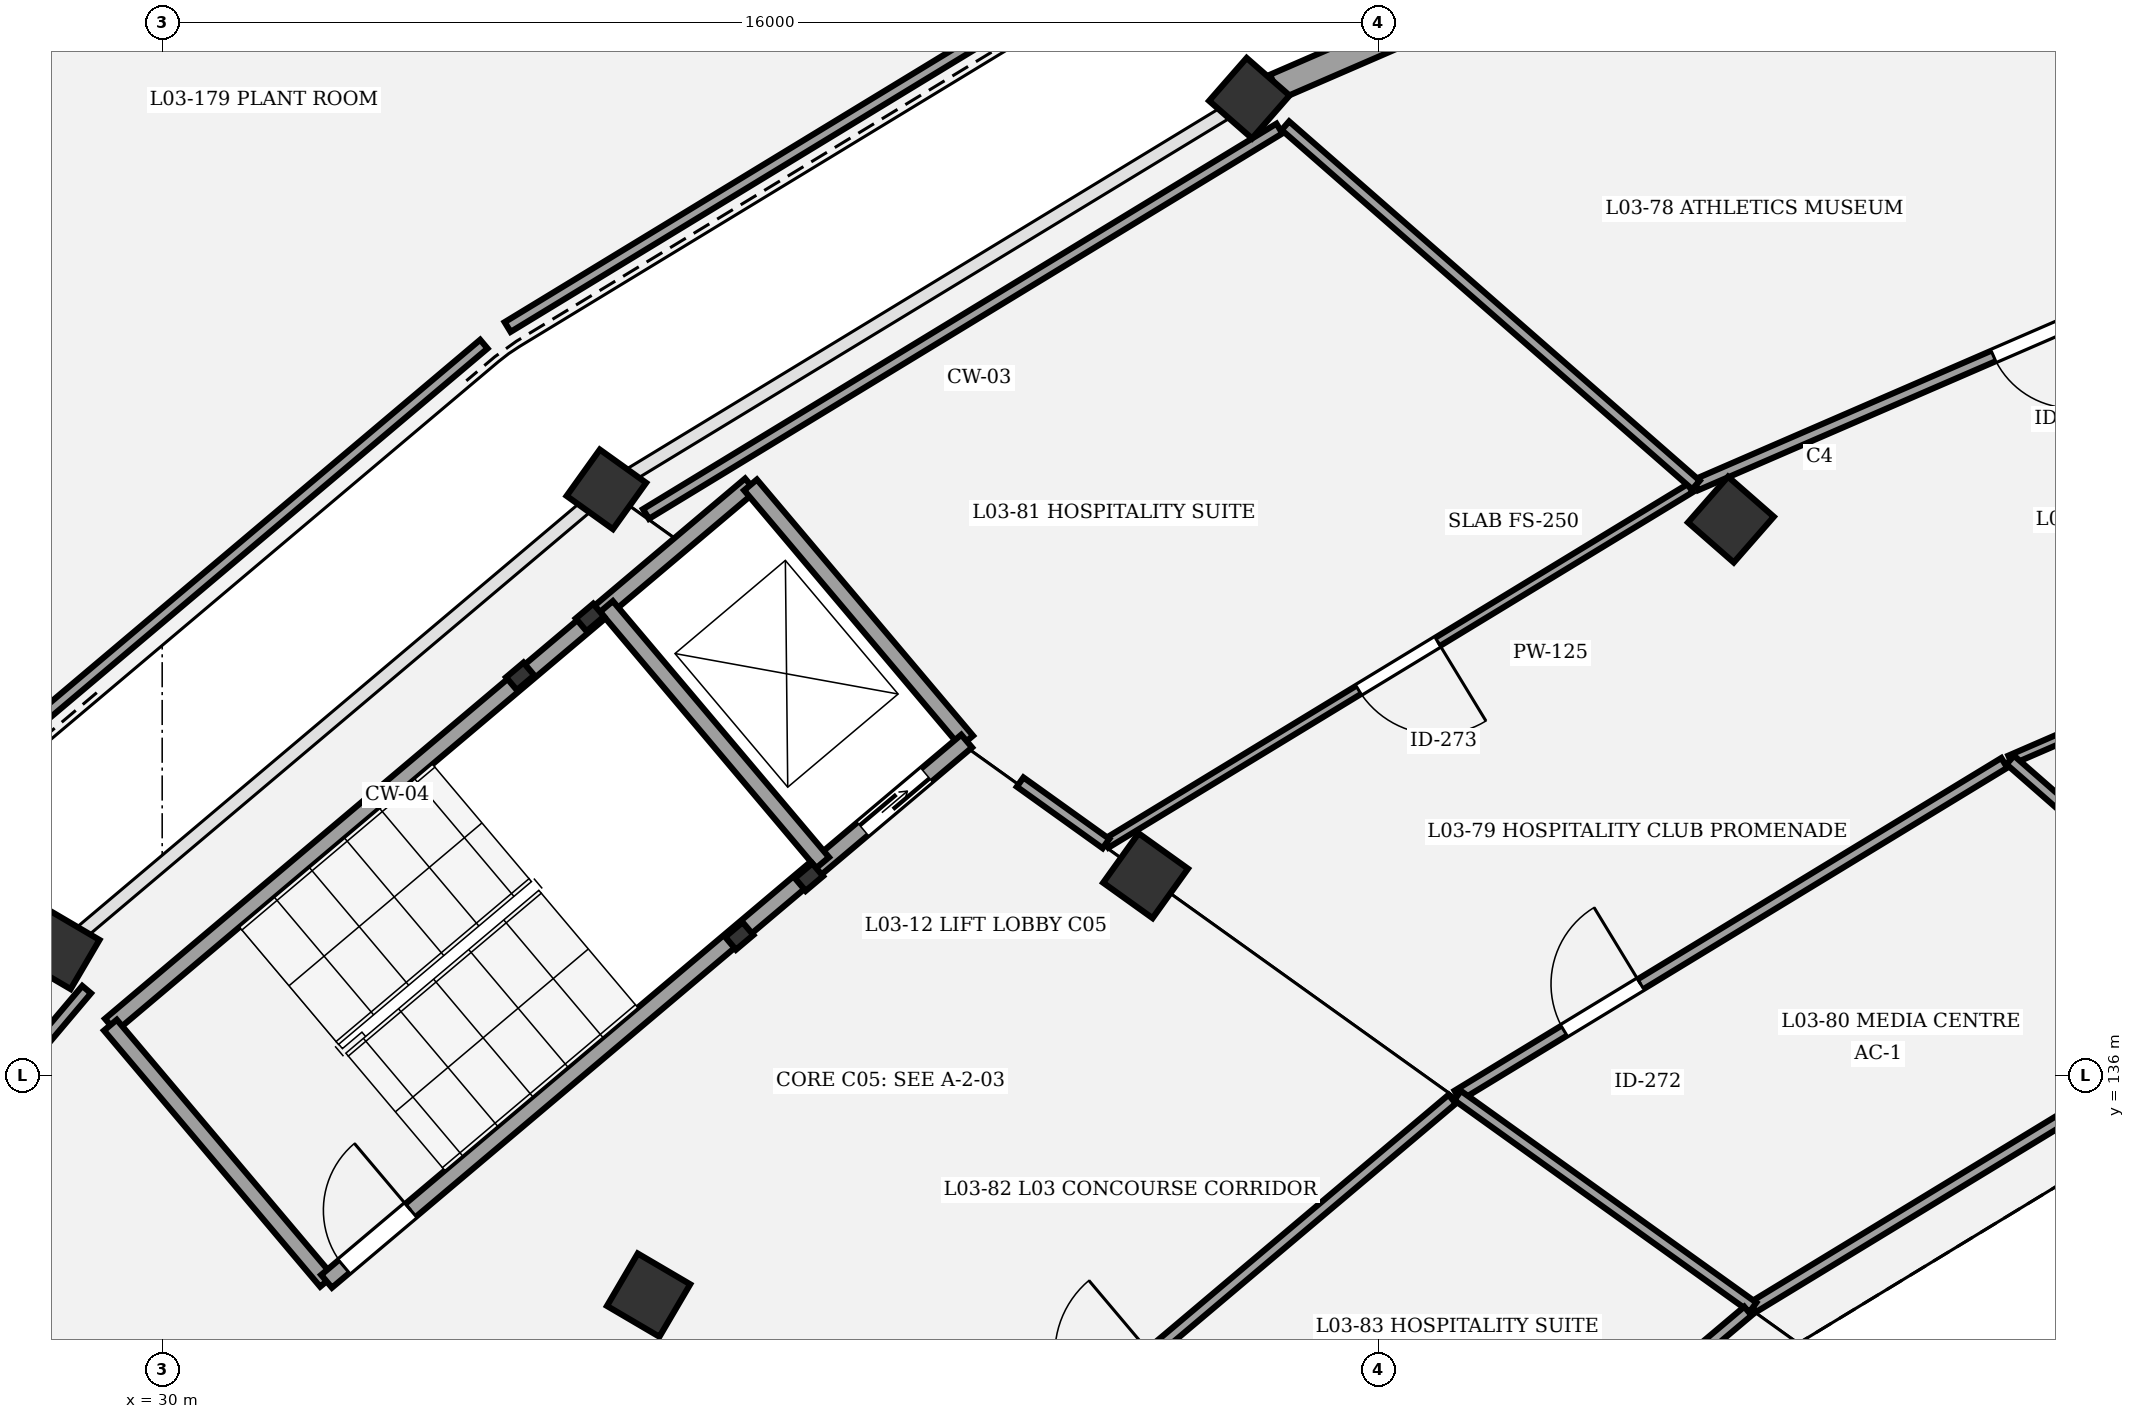
"""IFC4 building model, lengths in metres.
Left out: names, types, materials, properties, quantities, classifications, styles, units other than length and angle.
Written with IfcOpenShell. Run it as: python <this file> out.ifc"""

import sys

from ifc_helpers import new_model, si_unit, direction, frame, frame_2d, origin, origin_2d, place, context, subcontext, project, spatial, rectangle, extrude, element, fill, save


model = new_model("IFC4")
c1 = context("Model", 3, precision=1e-05, world=origin(), true_north=direction((0.0, 1.0)))
c2 = subcontext(c1, "Body", "Model", "MODEL_VIEW")
j1 = project(units=[si_unit("LENGTHUNIT", "METRE"), si_unit("PLANEANGLEUNIT", "RADIAN")], contexts=[c1])
p1 = place(None, origin())
s1 = spatial("IfcSite", under=j1, at=p1, CompositionType="ELEMENT")
p2 = place(p1, origin())
s2 = spatial("IfcBuilding", under=s1, at=p2, CompositionType="ELEMENT")
p3 = place(p2, frame((0.0, 0.0, 14.7)))
s3 = spatial("IfcBuildingStorey", under=s2, at=p3, CompositionType="ELEMENT", Elevation=14.7)
p4 = place(p3, frame((50.64, 143.317, 0.0), z_axis=(0.0, 0.0, 1.0), x_axis=(-0.752529860433, 0.658558128912, 0.0)))
e1 = element("IfcColumn", 1, at=p4, inside=s3, PredefinedType="COLUMN", context=c2, shape_type="SweptSolid", body=[
    extrude(rectangle(XDim=0.8, YDim=0.8, at=origin_2d()), origin(), (0.0, 0.0, 1.0), 4.5),
])
p5 = place(p3, frame((44.304, 148.861, 0.0), z_axis=(0.0, 0.0, 1.0), x_axis=(-0.752529860433, 0.658558128912, 0.0)))
e2 = element("IfcColumn", 2, at=p5, inside=s3, PredefinedType="COLUMN", context=c2, shape_type="SweptSolid", body=[
    extrude(rectangle(XDim=0.75, YDim=0.75, at=origin_2d()), origin(), (0.0, 0.0, 1.0), 4.5),
])
p6 = place(p3, frame((42.939, 138.632, 0.0), z_axis=(0.0, 0.0, 1.0), x_axis=(-0.812897512265, 0.582406760395, 0.0)))
e3 = element("IfcColumn", 3, at=p6, inside=s3, PredefinedType="COLUMN", context=c2, shape_type="SweptSolid", body=[
    extrude(rectangle(XDim=0.8, YDim=0.8, at=origin_2d()), origin(), (0.0, 0.0, 1.0), 4.5),
])
p7 = place(p3, frame((35.844, 143.715, 0.0), z_axis=(0.0, 0.0, 1.0), x_axis=(-0.812897512265, 0.582406760395, 0.0)))
e4 = element("IfcColumn", 4, at=p7, inside=s3, PredefinedType="COLUMN", context=c2, shape_type="SweptSolid", body=[
    extrude(rectangle(XDim=0.75, YDim=0.75, at=origin_2d()), origin(), (0.0, 0.0, 1.0), 4.5),
])
p8 = place(p3, frame((36.4, 133.114, 0.0), z_axis=(0.0, 0.0, 1.0), x_axis=(-0.862513669207, 0.506033764121, 0.0)))
e5 = element("IfcColumn", 5, at=p8, inside=s3, PredefinedType="COLUMN", context=c2, shape_type="SweptSolid", body=[
    extrude(rectangle(XDim=0.8, YDim=0.8, at=origin_2d()), origin(), (0.0, 0.0, 1.0), 4.5),
])
p9 = place(p3, frame((28.662, 137.654, 0.0), z_axis=(0.0, 0.0, 1.0), x_axis=(-0.862513669207, 0.506033764121, 0.0)))
e6 = element("IfcColumn", 6, at=p9, inside=s3, PredefinedType="COLUMN", context=c2, shape_type="SweptSolid", body=[
    extrude(rectangle(XDim=0.75, YDim=0.75, at=origin_2d()), origin(), (0.0, 0.0, 1.0), 4.5),
])
p10 = place(p3, frame((44.646, 149.009, 0.0), z_axis=(0.0, 0.0, 1.0), x_axis=(0.917502782842, 0.397729359587, 0.0)))
e7 = element("IfcWall", 7, at=p10, inside=s3, PredefinedType="STANDARD", context=c2, shape_type="SweptSolid", body=[
    extrude(rectangle(XDim=9.89, YDim=0.35, at=frame_2d((4.945, 0.0))), origin(), (0.0, 0.0, 1.0), 3.42),
])
p11 = place(p10, frame((4.045, 0.0, 0.0)))
e8 = element("IfcOpeningElement", 8, at=p11, cuts=e7, PredefinedType="OPENING", context=c2, shape_type="SweptSolid", body=[
    extrude(rectangle(XDim=1.8, YDim=2.4, at=frame_2d((0.9, 1.2))), frame((0.0, 0.185, 0.0), z_axis=(0.0, -1.0, 0.0), x_axis=(1.0, 0.0, 0.0)), (0.0, 0.0, 1.0), 0.37),
])
for number, where, z_axis, x_axis in (
    (9, (37.593, 137.839, 0.0), (0.0, 0.0, 1.0), (0.764, 0.645, 0.0)),
    (10, (38.51, 138.613, 0.0), (0.0, 0.0, 1.0), (0.764, 0.645, 0.0)),
    (11, (35.627, 142.029, 0.0), (0.0, 0.0, 1.0), (0.764, 0.645, 0.0)),
    (12, (34.71, 141.255, 0.0), (0.0, 0.0, 1.0), (0.764, 0.645, 0.0)),
):
    element("IfcColumn", number, at=place(p3, frame(where, z_axis=z_axis, x_axis=x_axis)), inside=s3, PredefinedType="COLUMN", context=c2, shape_type="SweptSolid", body=[
        extrude(rectangle(XDim=0.3, YDim=0.22, at=origin_2d()), origin(), (0.0, 0.0, 1.0), 4.5),
    ])
p12 = place(p3, frame((29.319, 136.666, 0.0), z_axis=(0.0, 0.0, 1.0), x_axis=(0.764247804305, 0.644922703598, 0.0)))
e13 = element("IfcWall", 13, at=p12, inside=s3, PredefinedType="SHEAR", context=c2, shape_type="SweptSolid", body=[
    extrude(rectangle(XDim=11.02, YDim=0.22, at=frame_2d((5.51, 0.0))), origin(), (0.0, 0.0, 1.0), 4.25),
])
p13 = place(p3, frame((32.163, 133.296, 0.0), z_axis=(0.0, 0.0, 1.0), x_axis=(-0.644904288042, 0.764263344185, 0.0)))
e14 = element("IfcWall", 14, at=p13, inside=s3, PredefinedType="SHEAR", context=c2, shape_type="SweptSolid", body=[
    extrude(rectangle(XDim=4.41, YDim=0.22, at=frame_2d((2.205, 0.0))), origin(), (0.0, 0.0, 1.0), 4.25),
])
p14 = place(p3, frame((40.585, 140.403, 0.0), z_axis=(0.0, 0.0, 1.0), x_axis=(-0.644936622785, 0.764236058159, 0.0)))
e15 = element("IfcWall", 15, at=p14, inside=s3, PredefinedType="SHEAR", context=c2, shape_type="SweptSolid", body=[
    extrude(rectangle(XDim=4.41, YDim=0.22, at=frame_2d((2.205, 0.0))), origin(), (0.0, 0.0, 1.0), 4.25),
])
p15 = place(p3, frame((32.163, 133.296, 0.0), z_axis=(0.0, 0.0, 1.0), x_axis=(0.764257018762, 0.644911784102, 0.0)))
e16 = element("IfcWall", 16, at=p15, inside=s3, PredefinedType="SHEAR", context=c2, shape_type="SweptSolid", body=[
    extrude(rectangle(XDim=11.02, YDim=0.22, at=frame_2d((5.51, 0.0))), origin(), (0.0, 0.0, 1.0), 4.25),
])
p16 = place(p15, frame((0.3, 0.0, 0.0)))
e17 = element("IfcOpeningElement", 17, at=p16, cuts=e16, PredefinedType="OPENING", context=c2, shape_type="SweptSolid", body=[
    extrude(rectangle(XDim=1.15, YDim=2.15, at=frame_2d((0.575, 1.075))), frame((0.0, 0.12, 0.0), z_axis=(0.0, -1.0, 0.0), x_axis=(1.0, 0.0, 0.0)), (0.0, 0.0, 1.0), 0.24),
])
p17 = place(p15, frame((9.23, 0.0, 0.0)))
e18 = element("IfcOpeningElement", 18, at=p17, cuts=e16, PredefinedType="OPENING", context=c2, shape_type="SweptSolid", body=[
    extrude(rectangle(XDim=1.1, YDim=2.15, at=frame_2d((0.55, 1.075))), frame((0.0, 0.12, 0.0), z_axis=(0.0, -1.0, 0.0), x_axis=(1.0, 0.0, 0.0)), (0.0, 0.0, 1.0), 0.24),
])
p18 = place(p3, frame((38.689, 138.803, 0.0), z_axis=(0.0, 0.0, 1.0), x_axis=(-0.644904288042, 0.764263344185, 0.0)))
e19 = element("IfcWall", 19, at=p18, inside=s3, PredefinedType="SHEAR", context=c2, shape_type="SweptSolid", body=[
    extrude(rectangle(XDim=4.41, YDim=0.22, at=frame_2d((2.205, 0.0))), origin(), (0.0, 0.0, 1.0), 4.25),
])
p19 = place(p3, frame((54.315, 140.154, 0.0), z_axis=(0.0, 0.0, 1.0), x_axis=(0.917494590455, 0.397748257677, 0.0)))
e20 = element("IfcWall", 20, at=p19, inside=s3, PredefinedType="PARTITIONING", context=c2, shape_type="SweptSolid", body=[
    extrude(rectangle(XDim=9.049, YDim=0.125, at=frame_2d((4.525, 0.0))), origin(), (0.0, 0.0, 1.0), 3.25),
])
p20 = place(p19, frame((1.782, 0.0, 0.0)))
e21 = element("IfcOpeningElement", 21, at=p20, cuts=e20, PredefinedType="OPENING", context=c2, shape_type="SweptSolid", body=[
    extrude(rectangle(XDim=1.1, YDim=2.2, at=frame_2d((0.55, 1.1))), frame((0.0, 0.073, 0.0), z_axis=(0.0, -1.0, 0.0), x_axis=(1.0, 0.0, 0.0)), (0.0, 0.0, 1.0), 0.145),
])
p21 = place(p3, frame((59.054, 147.619, 0.0), z_axis=(0.0, 0.0, 1.0), x_axis=(-0.917508957037, -0.39771511633, 0.0)))
e22 = element("IfcWall", 22, at=p21, inside=s3, PredefinedType="PARTITIONING", context=c2, shape_type="SweptSolid", body=[
    extrude(rectangle(XDim=9.671, YDim=0.15, at=frame_2d((4.836, 0.0))), origin(), (0.0, 0.0, 1.0), 3.25),
])
p22 = place(p21, frame((4.266, 0.0, 0.0)))
e23 = element("IfcOpeningElement", 23, at=p22, cuts=e22, PredefinedType="OPENING", context=c2, shape_type="SweptSolid", body=[
    extrude(rectangle(XDim=1.14, YDim=2.2, at=frame_2d((0.57, 1.1))), frame((0.0, 0.085, 0.0), z_axis=(0.0, -1.0, 0.0), x_axis=(1.0, 0.0, 0.0)), (0.0, 0.0, 1.0), 0.17),
])
p23 = place(p3, frame((47.043, 135.74, 0.0), z_axis=(0.0, 0.0, 1.0), x_axis=(0.854330104408, 0.519730769439, 0.0)))
e24 = element("IfcWall", 24, at=p23, inside=s3, PredefinedType="PARTITIONING", context=c2, shape_type="SweptSolid", body=[
    extrude(rectangle(XDim=8.42, YDim=0.15, at=frame_2d((4.21, 0.0))), origin(), (0.0, 0.0, 1.0), 3.25),
])
p24 = place(p23, frame((1.64, 0.0, 0.0)))
e25 = element("IfcOpeningElement", 25, at=p24, cuts=e24, PredefinedType="OPENING", context=c2, shape_type="SweptSolid", body=[
    extrude(rectangle(XDim=1.18, YDim=2.2, at=frame_2d((0.59, 1.1))), frame((0.0, 0.085, 0.0), z_axis=(0.0, -1.0, 0.0), x_axis=(1.0, 0.0, 0.0)), (0.0, 0.0, 1.0), 0.17),
])
p25 = place(p3, frame((50.105, 143.731, 0.0), z_axis=(0.0, 0.0, 1.0), x_axis=(-0.854321649351, -0.519744667554, 0.0)))
e26 = element("IfcWall", 26, at=p25, inside=s3, PredefinedType="PARTITIONING", context=c2, shape_type="SweptSolid", body=[
    extrude(rectangle(XDim=8.999, YDim=0.125, at=frame_2d((4.499, 0.0))), origin(), (0.0, 0.0, 1.0), 3.25),
])
p26 = place(p25, frame((3.889, 0.0, 0.0)))
e27 = element("IfcOpeningElement", 27, at=p26, cuts=e26, PredefinedType="OPENING", context=c2, shape_type="SweptSolid", body=[
    extrude(rectangle(XDim=1.22, YDim=2.2, at=frame_2d((0.61, 1.1))), frame((0.0, 0.073, 0.0), z_axis=(0.0, -1.0, 0.0), x_axis=(1.0, 0.0, 0.0)), (0.0, 0.0, 1.0), 0.145),
])
p27 = place(p3, frame((40.867, 130.539, 0.0), z_axis=(0.0, 0.0, 1.0), x_axis=(0.764249122867, 0.644921141068, 0.0)))
e28 = element("IfcWall", 28, at=p27, inside=s3, PredefinedType="PARTITIONING", context=c2, shape_type="SweptSolid", body=[
    extrude(rectangle(XDim=7.99, YDim=0.15, at=frame_2d((3.995, 0.0))), origin(), (0.0, 0.0, 1.0), 3.25),
])
p28 = place(p27, frame((1.538, 0.0, 0.0)))
e29 = element("IfcOpeningElement", 29, at=p28, cuts=e28, PredefinedType="OPENING", context=c2, shape_type="SweptSolid", body=[
    extrude(rectangle(XDim=1.26, YDim=2.2, at=frame_2d((0.63, 1.1))), frame((0.0, 0.085, 0.0), z_axis=(0.0, -1.0, 0.0), x_axis=(1.0, 0.0, 0.0)), (0.0, 0.0, 1.0), 0.17),
])
p29 = place(p3, frame((57.783, 137.119, 0.0), z_axis=(0.0, 0.0, 1.0), x_axis=(-0.752583258122, 0.658497106747, 0.0)))
e30 = element("IfcWall", 30, at=p29, inside=s3, PredefinedType="PARTITIONING", context=c2, shape_type="SweptSolid", body=[
    extrude(rectangle(XDim=4.608, YDim=0.15, at=frame_2d((2.304, 0.0))), origin(), (0.0, 0.0, 1.0), 3.25),
])
p30 = place(p3, frame((50.18, 143.772, 0.0), z_axis=(0.0, 0.0, 1.0), x_axis=(-0.752576694707, 0.658504607869, 0.0)))
e31 = element("IfcWall", 31, at=p30, inside=s3, PredefinedType="PARTITIONING", context=c2, shape_type="SweptSolid", body=[
    extrude(rectangle(XDim=7.178, YDim=0.15, at=frame_2d((3.589, 0.0))), origin(), (0.0, 0.0, 1.0), 3.25),
])
p31 = place(p3, frame((57.709, 137.078, 0.0), z_axis=(0.0, 0.0, 1.0), x_axis=(-0.854324504961, -0.519739973663, 0.0)))
e32 = element("IfcWall", 32, at=p31, inside=s3, PredefinedType="PARTITIONING", context=c2, shape_type="SweptSolid", body=[
    extrude(rectangle(XDim=7.934, YDim=0.15, at=frame_2d((3.967, 0.0))), origin(), (0.0, 0.0, 1.0), 3.25),
])
p32 = place(p3, frame((50.931, 132.955, 0.0), z_axis=(0.0, 0.0, 1.0), x_axis=(-0.812884001359, 0.582425617856, 0.0)))
e33 = element("IfcWall", 33, at=p32, inside=s3, PredefinedType="PARTITIONING", context=c2, shape_type="SweptSolid", body=[
    extrude(rectangle(XDim=4.782, YDim=0.15, at=frame_2d((2.391, 0.0))), origin(), (0.0, 0.0, 1.0), 3.25),
])
p33 = place(p3, frame((36.365, 143.391, 0.0), z_axis=(0.0, 0.0, 1.0), x_axis=(0.854323689683, 0.519741313777, 0.0)))
e34 = element("IfcWall", 34, at=p33, inside=s3, PredefinedType="PARTITIONING", context=c2, shape_type="SweptSolid", body=[
    extrude(rectangle(XDim=9.756, YDim=0.15, at=frame_2d((4.878, 0.0))), origin(), (0.0, 0.0, 1.0), 3.25),
])
p34 = place(p3, frame((42.418, 139.054, 0.0), z_axis=(0.0, 0.0, 1.0), x_axis=(-0.812925279681, 0.582368001916, 0.0)))
e35 = element("IfcWall", 35, at=p34, inside=s3, PredefinedType="PARTITIONING", context=c2, shape_type="SweptSolid", body=[
    extrude(rectangle(XDim=1.389, YDim=0.15, at=frame_2d((0.695, 0.0))), origin(), (0.0, 0.0, 1.0), 3.25),
])
p35 = place(p3, frame((50.864, 132.904, 0.0), z_axis=(0.0, 0.0, 1.0), x_axis=(-0.764259013583, -0.644909420118, 0.0)))
e36 = element("IfcWall", 36, at=p35, inside=s3, PredefinedType="PARTITIONING", context=c2, shape_type="SweptSolid", body=[
    extrude(rectangle(XDim=7.528, YDim=0.15, at=frame_2d((3.764, 0.0))), origin(), (0.0, 0.0, 1.0), 3.25),
])
p36 = place(p3, frame((23.344, 130.428, 0.0), z_axis=(0.0, 0.0, 1.0), x_axis=(0.645169991826, 0.764039057671, 0.0)))
e37 = element("IfcWall", 37, at=p36, inside=s3, PredefinedType="PARTITIONING", context=c2, shape_type="SweptSolid", body=[
    extrude(rectangle(XDim=8.776, YDim=0.15, at=frame_2d((4.388, 0.0))), origin(), (0.0, 0.0, 1.0), 3.25),
])
p37 = place(p3, frame((43.004, 150.997, 0.0), z_axis=(0.0, 0.0, 1.0), x_axis=(-0.854333268174, -0.519725568826, 0.0)))
e38 = element("IfcWall", 38, at=p37, inside=s3, PredefinedType="PARTITIONING", context=c2, shape_type="SweptSolid", body=[
    extrude(rectangle(XDim=9.902, YDim=0.15, at=frame_2d((4.951, 0.0))), origin(), (0.0, 0.0, 1.0), 3.25),
])
p38 = place(p3, frame((34.232, 145.625, 0.0), z_axis=(0.0, 0.0, 1.0), x_axis=(-0.764245949545, -0.644924901523, 0.0)))
e39 = element("IfcWall", 39, at=p38, inside=s3, PredefinedType="PARTITIONING", context=c2, shape_type="SweptSolid", body=[
    extrude(rectangle(XDim=9.332, YDim=0.15, at=frame_2d((4.666, 0.0))), origin(), (0.0, 0.0, 1.0), 3.25),
])
p39 = place(p16, origin())
e40 = element("IfcDoor", 40, at=p39, inside=s3, OperationType="SINGLE_SWING_RIGHT", PredefinedType="DOOR", context=c2, shape_type="SweptSolid", body=[
    extrude(rectangle(XDim=1.15, YDim=2.15, at=frame_2d((0.575, 1.075))), frame((0.0, 0.025, 0.0), z_axis=(0.0, -1.0, 0.0), x_axis=(1.0, 0.0, 0.0)), (0.0, 0.0, 1.0), 0.05),
])
fill(e17, e40)
p40 = place(p17, origin())
e41 = element("IfcDoor", 41, at=p40, inside=s3, OperationType="DOUBLE_DOOR_SLIDING", PredefinedType="DOOR", context=c2, shape_type="SweptSolid", body=[
    extrude(rectangle(XDim=1.1, YDim=2.15, at=frame_2d((0.55, 1.075))), frame((0.0, 0.025, 0.0), z_axis=(0.0, -1.0, 0.0), x_axis=(1.0, 0.0, 0.0)), (0.0, 0.0, 1.0), 0.05),
])
fill(e18, e41)
p41 = place(p22, origin())
e42 = element("IfcDoor", 42, at=p41, inside=s3, OperationType="SINGLE_SWING_LEFT", PredefinedType="DOOR", context=c2, shape_type="SweptSolid", body=[
    extrude(rectangle(XDim=1.14, YDim=2.2, at=frame_2d((0.57, 1.1))), frame((0.0, 0.025, 0.0), z_axis=(0.0, -1.0, 0.0), x_axis=(1.0, 0.0, 0.0)), (0.0, 0.0, 1.0), 0.05),
])
fill(e23, e42)
p42 = place(p24, origin())
e43 = element("IfcDoor", 43, at=p42, inside=s3, OperationType="SINGLE_SWING_RIGHT", PredefinedType="DOOR", context=c2, shape_type="SweptSolid", body=[
    extrude(rectangle(XDim=1.18, YDim=2.2, at=frame_2d((0.59, 1.1))), frame((0.0, 0.025, 0.0), z_axis=(0.0, -1.0, 0.0), x_axis=(1.0, 0.0, 0.0)), (0.0, 0.0, 1.0), 0.05),
])
fill(e25, e43)
p43 = place(p26, origin())
e44 = element("IfcDoor", 44, at=p43, inside=s3, OperationType="SINGLE_SWING_LEFT", PredefinedType="DOOR", context=c2, shape_type="SweptSolid", body=[
    extrude(rectangle(XDim=1.22, YDim=2.2, at=frame_2d((0.61, 1.1))), frame((0.0, 0.025, 0.0), z_axis=(0.0, -1.0, 0.0), x_axis=(1.0, 0.0, 0.0)), (0.0, 0.0, 1.0), 0.05),
])
fill(e27, e44)
save(model, sys.argv[1])
